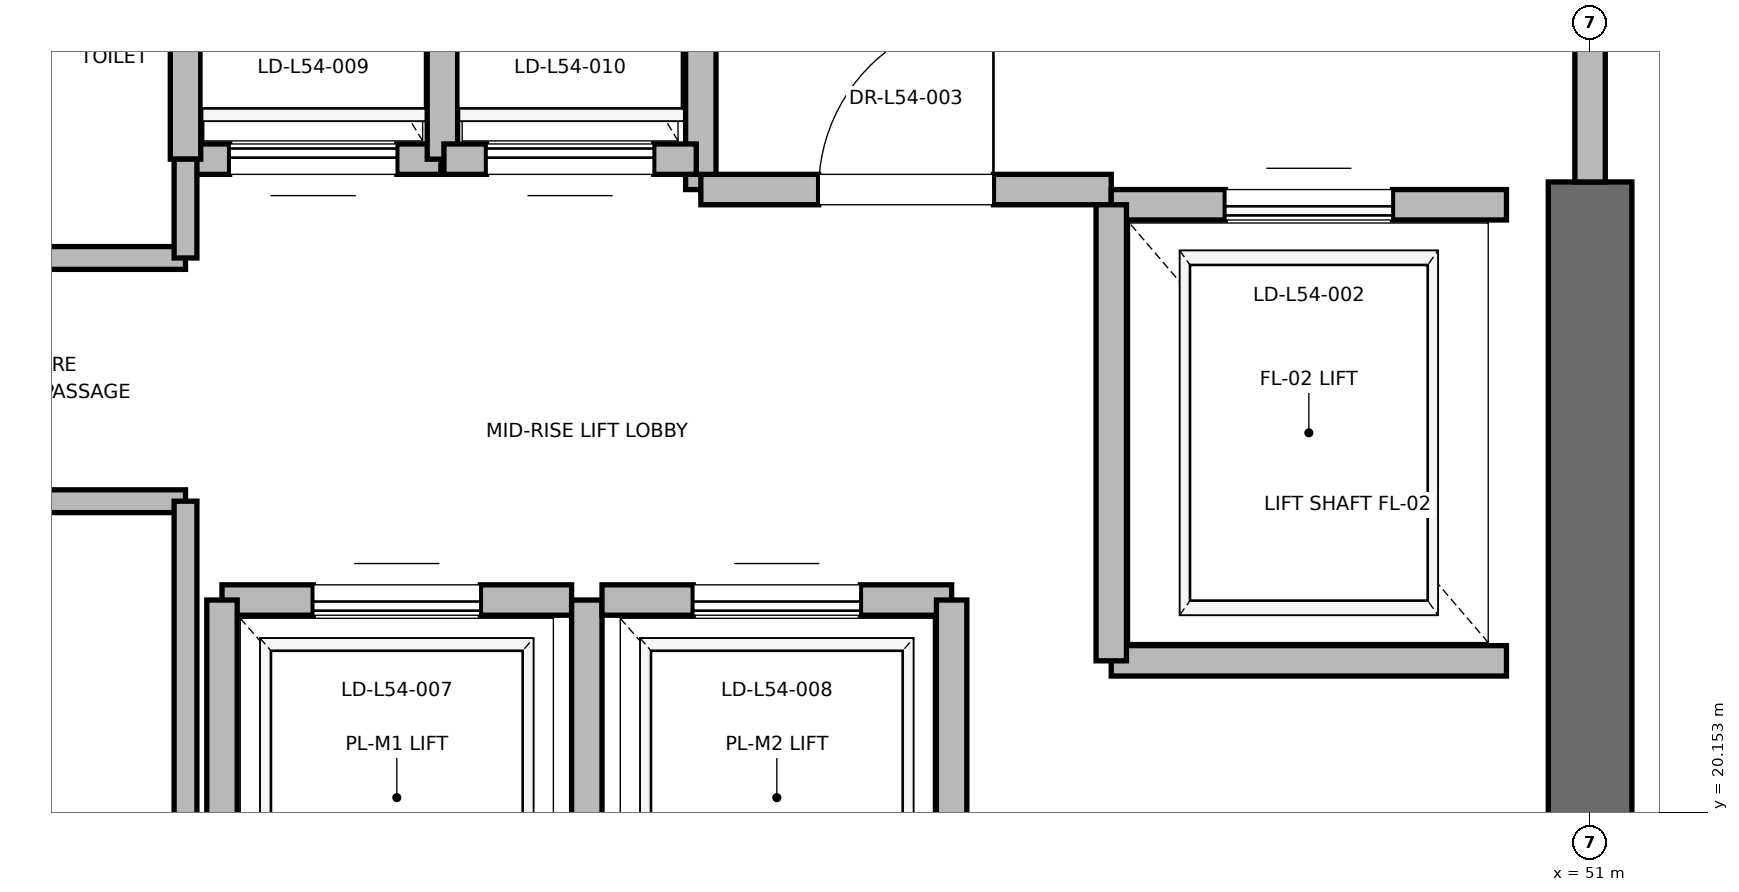
"""IFC4 building model, lengths in metres.
Left out: names, types, materials, properties, quantities, classifications, styles, units other than length and angle.
Written with IfcOpenShell. Run it as: python <this file> out.ifc"""

import sys

from ifc_helpers import new_model, si_unit, direction, frame, frame_2d, origin, place, context, subcontext, project, spatial, rectangle, extrude, element, fill, save


model = new_model("IFC4")
c1 = context("Model", 3, precision=1e-05, world=origin(), true_north=direction((0.0, 1.0)))
c2 = subcontext(c1, "Body", "Model", "MODEL_VIEW")
j1 = project(units=[si_unit("LENGTHUNIT", "METRE"), si_unit("PLANEANGLEUNIT", "RADIAN")], contexts=[c1])
p1 = place(None, origin())
s1 = spatial("IfcSite", under=j1, at=p1, CompositionType="ELEMENT")
p2 = place(p1, origin())
s2 = spatial("IfcBuilding", under=s1, at=p2, CompositionType="ELEMENT")
p3 = place(p2, frame((0.0, 0.0, 233.2)))
s3 = spatial("IfcBuildingStorey", under=s2, at=p3, CompositionType="ELEMENT", Elevation=233.2)
p4 = place(p3, frame((51.0, 18.5, 0.0), z_axis=(0.0, 0.0, 1.0), x_axis=(0.0, 1.0, 0.0)))
e1 = element("IfcWall", 1, at=p4, inside=s3, PredefinedType="SHEAR", context=c2, shape_type="SweptSolid", body=[
    extrude(rectangle(XDim=5.8, YDim=0.55, at=frame_2d((2.9, 0.0))), origin(), (0.0, 0.0, 1.0), 4.7),
])
p5 = place(p3, frame((45.15, 24.25, 0.0), z_axis=(0.0, 0.0, 1.0), x_axis=(0.0, 1.0, 0.0)))
e2 = element("IfcWall", 2, at=p5, inside=s3, PredefinedType="PARTITIONING", context=c2, shape_type="SweptSolid", body=[
    extrude(rectangle(XDim=3.37, YDim=0.2, at=frame_2d((1.685, 0.0))), origin(), (0.0, 0.0, 1.0), 4.7),
])
p6 = place(p3, frame((45.15, 24.25, 0.0), z_axis=(0.0, 0.0, 1.0), x_axis=(1.0, 0.0, 0.0)))
e3 = element("IfcWall", 3, at=p6, inside=s3, PredefinedType="PARTITIONING", context=c2, shape_type="SweptSolid", body=[
    extrude(rectangle(XDim=2.7, YDim=0.2, at=frame_2d((1.35, 0.0))), origin(), (0.0, 0.0, 1.0), 4.7),
])
p7 = place(p6, frame((0.775, 0.0, 0.0)))
e4 = element("IfcOpeningElement", 4, at=p7, cuts=e3, PredefinedType="OPENING", context=c2, shape_type="SweptSolid", body=[
    extrude(rectangle(XDim=1.15, YDim=2.2, at=frame_2d((0.575, 1.1))), frame((0.0, 0.1, 0.0), z_axis=(0.0, -1.0, 0.0), x_axis=(1.0, 0.0, 0.0)), (0.0, 0.0, 1.0), 0.2),
])
p8 = place(p3, frame((51.0, 24.3, 0.0), z_axis=(0.0, 0.0, 1.0), x_axis=(0.0, 1.0, 0.0)))
e5 = element("IfcWall", 5, at=p8, inside=s3, PredefinedType="PARTITIONING", context=c2, shape_type="SweptSolid", body=[
    extrude(rectangle(XDim=3.4, YDim=0.2, at=frame_2d((1.7, 0.0))), origin(), (0.0, 0.0, 1.0), 3.68),
])
p9 = place(p8, frame((1.125, 0.0, 0.0)))
e6 = element("IfcOpeningElement", 6, at=p9, cuts=e5, PredefinedType="OPENING", context=c2, shape_type="SweptSolid", body=[
    extrude(rectangle(XDim=1.15, YDim=2.2, at=frame_2d((0.575, 1.1))), frame((0.0, 0.1, 0.0), z_axis=(0.0, -1.0, 0.0), x_axis=(1.0, 0.0, 0.0)), (0.0, 0.0, 1.0), 0.2),
])
p10 = place(p3, frame((47.85, 21.15, 0.0), z_axis=(0.0, 0.0, 1.0), x_axis=(1.0, 0.0, 0.0)))
e7 = element("IfcWall", 7, at=p10, inside=s3, PredefinedType="SOLIDWALL", context=c2, shape_type="SweptSolid", body=[
    extrude(rectangle(XDim=2.6, YDim=0.2, at=frame_2d((1.3, 0.0))), origin(), (0.0, 0.0, 1.0), 4.7),
])
p11 = place(p3, frame((50.45, 24.15, 0.0), z_axis=(0.0, 0.0, 1.0), x_axis=(-1.0, 0.0, 0.0)))
e8 = element("IfcWall", 8, at=p11, inside=s3, PredefinedType="SOLIDWALL", context=c2, shape_type="SweptSolid", body=[
    extrude(rectangle(XDim=2.6, YDim=0.2, at=frame_2d((1.3, 0.0))), origin(), (0.0, 0.0, 1.0), 3.68),
])
p12 = place(p11, frame((0.75, 0.0, 0.0)))
e9 = element("IfcOpeningElement", 9, at=p12, cuts=e8, PredefinedType="OPENING", context=c2, shape_type="SweptSolid", body=[
    extrude(rectangle(XDim=1.1, YDim=2.2, at=frame_2d((0.55, 1.1))), frame((0.0, 0.1, 0.0), z_axis=(0.0, -1.0, 0.0), x_axis=(1.0, 0.0, 0.0)), (0.0, 0.0, 1.0), 0.2),
])
p13 = place(p3, frame((47.85, 24.15, 0.0), z_axis=(0.0, 0.0, 1.0), x_axis=(0.0, -1.0, 0.0)))
e10 = element("IfcWall", 10, at=p13, inside=s3, PredefinedType="SOLIDWALL", context=c2, shape_type="SweptSolid", body=[
    extrude(rectangle(XDim=3.0, YDim=0.2, at=frame_2d((1.5, 0.0))), origin(), (0.0, 0.0, 1.0), 4.7),
])
p14 = place(p3, frame((44.3, 21.55, 0.0), z_axis=(0.0, 0.0, 1.0), x_axis=(-1.0, 0.0, 0.0)))
e11 = element("IfcWall", 11, at=p14, inside=s3, PredefinedType="SOLIDWALL", context=c2, shape_type="SweptSolid", body=[
    extrude(rectangle(XDim=2.3, YDim=0.2, at=frame_2d((1.15, 0.0))), origin(), (0.0, 0.0, 1.0), 4.7),
])
p15 = place(p14, frame((0.6, 0.0, 0.0)))
e12 = element("IfcOpeningElement", 12, at=p15, cuts=e11, PredefinedType="OPENING", context=c2, shape_type="SweptSolid", body=[
    extrude(rectangle(XDim=1.1, YDim=2.2, at=frame_2d((0.55, 1.1))), frame((0.0, 0.1, 0.0), z_axis=(0.0, -1.0, 0.0), x_axis=(1.0, 0.0, 0.0)), (0.0, 0.0, 1.0), 0.2),
])
p16 = place(p3, frame((42.0, 21.55, 0.0), z_axis=(0.0, 0.0, 1.0), x_axis=(0.0, -1.0, 0.0)))
e13 = element("IfcWall", 13, at=p16, inside=s3, PredefinedType="SOLIDWALL", context=c2, shape_type="SweptSolid", body=[
    extrude(rectangle(XDim=2.6, YDim=0.2, at=frame_2d((1.3, 0.0))), origin(), (0.0, 0.0, 1.0), 3.68),
])
p17 = place(p3, frame((44.4, 18.95, 0.0), z_axis=(0.0, 0.0, 1.0), x_axis=(0.0, 1.0, 0.0)))
e14 = element("IfcWall", 14, at=p17, inside=s3, PredefinedType="SOLIDWALL", context=c2, shape_type="SweptSolid", body=[
    extrude(rectangle(XDim=2.6, YDim=0.2, at=frame_2d((1.3, 0.0))), origin(), (0.0, 0.0, 1.0), 4.7),
])
p18 = place(p3, frame((46.8, 21.55, 0.0), z_axis=(0.0, 0.0, 1.0), x_axis=(-1.0, 0.0, 0.0)))
e15 = element("IfcWall", 15, at=p18, inside=s3, PredefinedType="SOLIDWALL", context=c2, shape_type="SweptSolid", body=[
    extrude(rectangle(XDim=2.3, YDim=0.2, at=frame_2d((1.15, 0.0))), origin(), (0.0, 0.0, 1.0), 4.7),
])
p19 = place(p18, frame((0.6, 0.0, 0.0)))
e16 = element("IfcOpeningElement", 16, at=p19, cuts=e15, PredefinedType="OPENING", context=c2, shape_type="SweptSolid", body=[
    extrude(rectangle(XDim=1.1, YDim=2.2, at=frame_2d((0.55, 1.1))), frame((0.0, 0.1, 0.0), z_axis=(0.0, -1.0, 0.0), x_axis=(1.0, 0.0, 0.0)), (0.0, 0.0, 1.0), 0.2),
])
p20 = place(p3, frame((46.8, 18.95, 0.0), z_axis=(0.0, 0.0, 1.0), x_axis=(0.0, 1.0, 0.0)))
e17 = element("IfcWall", 17, at=p20, inside=s3, PredefinedType="SOLIDWALL", context=c2, shape_type="SweptSolid", body=[
    extrude(rectangle(XDim=2.6, YDim=0.2, at=frame_2d((1.3, 0.0))), origin(), (0.0, 0.0, 1.0), 4.7),
])
p21 = place(p3, frame((41.76, 24.45, 0.0), z_axis=(0.0, 0.0, 1.0), x_axis=(1.0, 0.0, 0.0)))
e18 = element("IfcWall", 18, at=p21, inside=s3, PredefinedType="SOLIDWALL", context=c2, shape_type="SweptSolid", body=[
    extrude(rectangle(XDim=1.68, YDim=0.2, at=frame_2d((0.84, 0.0))), origin(), (0.0, 0.0, 1.0), 4.7),
])
p22 = place(p21, frame((0.29, 0.0, 0.0)))
e19 = element("IfcOpeningElement", 19, at=p22, cuts=e18, PredefinedType="OPENING", context=c2, shape_type="SweptSolid", body=[
    extrude(rectangle(XDim=1.1, YDim=2.2, at=frame_2d((0.55, 1.1))), frame((0.0, 0.1, 0.0), z_axis=(0.0, -1.0, 0.0), x_axis=(1.0, 0.0, 0.0)), (0.0, 0.0, 1.0), 0.2),
])
for number, where, z_axis, x_axis in (
    (20, (41.76, 27.05, 0.0), (0.0, 0.0, 1.0), (0.0, -1.0, 0.0)),
    (21, (43.45, 24.45, 0.0), (0.0, 0.0, 1.0), (0.0, 1.0, 0.0)),
):
    element("IfcWall", number, at=place(p3, frame(where, z_axis=z_axis, x_axis=x_axis)), inside=s3, PredefinedType="SOLIDWALL", context=c2, shape_type="SweptSolid", body=[
        extrude(rectangle(XDim=2.6, YDim=0.2, at=frame_2d((1.3, 0.0))), origin(), (0.0, 0.0, 1.0), 4.7),
    ])
p23 = place(p3, frame((43.46, 24.45, 0.0), z_axis=(0.0, 0.0, 1.0), x_axis=(1.0, 0.0, 0.0)))
e22 = element("IfcWall", 22, at=p23, inside=s3, PredefinedType="SOLIDWALL", context=c2, shape_type="SweptSolid", body=[
    extrude(rectangle(XDim=1.66, YDim=0.2, at=frame_2d((0.83, 0.0))), origin(), (0.0, 0.0, 1.0), 4.7),
])
p24 = place(p23, frame((0.28, 0.0, 0.0)))
e23 = element("IfcOpeningElement", 23, at=p24, cuts=e22, PredefinedType="OPENING", context=c2, shape_type="SweptSolid", body=[
    extrude(rectangle(XDim=1.1, YDim=2.2, at=frame_2d((0.55, 1.1))), frame((0.0, 0.1, 0.0), z_axis=(0.0, -1.0, 0.0), x_axis=(1.0, 0.0, 0.0)), (0.0, 0.0, 1.0), 0.2),
])
for number, where, z_axis, x_axis in (
    (24, (39.95, 22.2, 0.0), (0.0, 0.0, 1.0), (1.0, 0.0, 0.0)),
    (25, (39.95, 23.8, 0.0), (0.0, 0.0, 1.0), (1.0, 0.0, 0.0)),
):
    element("IfcWall", number, at=place(p3, frame(where, z_axis=z_axis, x_axis=x_axis)), inside=s3, PredefinedType="PARTITIONING", context=c2, shape_type="SweptSolid", body=[
        extrude(rectangle(XDim=1.81, YDim=0.15, at=frame_2d((0.905, 0.0))), origin(), (0.0, 0.0, 1.0), 2.85),
    ])
p25 = place(p3, frame((41.76, 18.6, 0.0), z_axis=(0.0, 0.0, 1.0), x_axis=(0.0, 1.0, 0.0)))
e26 = element("IfcWall", 26, at=p25, inside=s3, PredefinedType="PARTITIONING", context=c2, shape_type="SweptSolid", body=[
    extrude(rectangle(XDim=3.6, YDim=0.15, at=frame_2d((1.8, 0.0))), origin(), (0.0, 0.0, 1.0), 2.85),
])
p26 = place(p3, frame((41.76, 23.8, 0.0), z_axis=(0.0, 0.0, 1.0), x_axis=(0.0, 1.0, 0.0)))
e27 = element("IfcWall", 27, at=p26, inside=s3, PredefinedType="PARTITIONING", context=c2, shape_type="SweptSolid", body=[
    extrude(rectangle(XDim=0.65, YDim=0.15, at=frame_2d((0.325, 0.0))), origin(), (0.0, 0.0, 1.0), 2.85),
])
p27 = place(p7, origin())
e28 = element("IfcDoor", 28, at=p27, inside=s3, OperationType="SINGLE_SWING_RIGHT", PredefinedType="DOOR", context=c2, shape_type="SweptSolid", body=[
    extrude(rectangle(XDim=1.15, YDim=2.2, at=frame_2d((0.575, 1.1))), frame((0.0, 0.025, 0.0), z_axis=(0.0, -1.0, 0.0), x_axis=(1.0, 0.0, 0.0)), (0.0, 0.0, 1.0), 0.05),
])
fill(e4, e28)
p28 = place(p12, origin())
e29 = element("IfcDoor", 29, at=p28, inside=s3, OperationType="SLIDING_TO_RIGHT", PredefinedType="DOOR", context=c2, shape_type="SweptSolid", body=[
    extrude(rectangle(XDim=1.1, YDim=2.2, at=frame_2d((0.55, 1.1))), frame((0.0, 0.025, 0.0), z_axis=(0.0, -1.0, 0.0), x_axis=(1.0, 0.0, 0.0)), (0.0, 0.0, 1.0), 0.05),
])
fill(e9, e29)
p29 = place(p15, origin())
e30 = element("IfcDoor", 30, at=p29, inside=s3, OperationType="SLIDING_TO_RIGHT", PredefinedType="DOOR", context=c2, shape_type="SweptSolid", body=[
    extrude(rectangle(XDim=1.1, YDim=2.2, at=frame_2d((0.55, 1.1))), frame((0.0, 0.025, 0.0), z_axis=(0.0, -1.0, 0.0), x_axis=(1.0, 0.0, 0.0)), (0.0, 0.0, 1.0), 0.05),
])
fill(e12, e30)
p30 = place(p19, origin())
e31 = element("IfcDoor", 31, at=p30, inside=s3, OperationType="SLIDING_TO_RIGHT", PredefinedType="DOOR", context=c2, shape_type="SweptSolid", body=[
    extrude(rectangle(XDim=1.1, YDim=2.2, at=frame_2d((0.55, 1.1))), frame((0.0, 0.025, 0.0), z_axis=(0.0, -1.0, 0.0), x_axis=(1.0, 0.0, 0.0)), (0.0, 0.0, 1.0), 0.05),
])
fill(e16, e31)
p31 = place(p22, origin())
e32 = element("IfcDoor", 32, at=p31, inside=s3, OperationType="SLIDING_TO_RIGHT", PredefinedType="DOOR", context=c2, shape_type="SweptSolid", body=[
    extrude(rectangle(XDim=1.1, YDim=2.2, at=frame_2d((0.55, 1.1))), frame((0.0, 0.025, 0.0), z_axis=(0.0, -1.0, 0.0), x_axis=(1.0, 0.0, 0.0)), (0.0, 0.0, 1.0), 0.05),
])
fill(e19, e32)
p32 = place(p24, origin())
e33 = element("IfcDoor", 33, at=p32, inside=s3, OperationType="SLIDING_TO_RIGHT", PredefinedType="DOOR", context=c2, shape_type="SweptSolid", body=[
    extrude(rectangle(XDim=1.1, YDim=2.2, at=frame_2d((0.55, 1.1))), frame((0.0, 0.025, 0.0), z_axis=(0.0, -1.0, 0.0), x_axis=(1.0, 0.0, 0.0)), (0.0, 0.0, 1.0), 0.05),
])
fill(e23, e33)
save(model, sys.argv[1])
